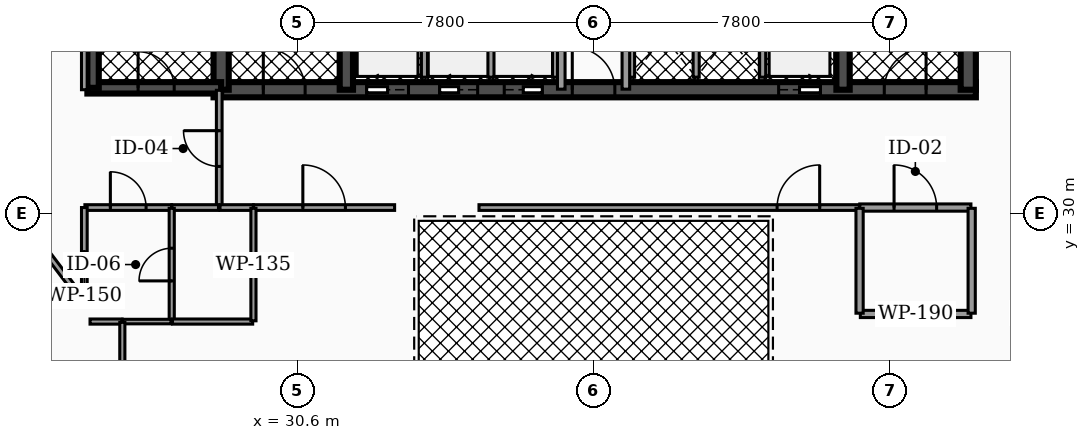
"""IFC4 building model, lengths in metres.
Left out: names, types, materials, properties, quantities, classifications, styles, units other than length and angle.
Written with IfcOpenShell. Run it as: python <this file> out.ifc"""

import sys

from ifc_helpers import new_model, si_unit, direction, frame, frame_2d, origin, place, context, subcontext, project, spatial, rectangle, extrude, element, fill, save


model = new_model("IFC4")
c1 = context("Model", 3, precision=1e-05, world=origin(), true_north=direction((0.0, 1.0)))
c2 = subcontext(c1, "Body", "Model", "MODEL_VIEW")
j1 = project(units=[si_unit("LENGTHUNIT", "METRE"), si_unit("PLANEANGLEUNIT", "RADIAN")], contexts=[c1])
p1 = place(None, origin())
s1 = spatial("IfcSite", under=j1, at=p1, CompositionType="ELEMENT")
p2 = place(p1, origin())
s2 = spatial("IfcBuilding", under=s1, at=p2, CompositionType="ELEMENT")
p3 = place(p2, frame((0.0, 0.0, 114.58)))
s3 = spatial("IfcBuildingStorey", under=s2, at=p3, CompositionType="ELEMENT", Elevation=114.58)
p4 = place(p3, frame((28.4, 33.25, 0.0), z_axis=(0.0, 0.0, 1.0), x_axis=(1.0, 0.0, 0.0)))
e1 = element("IfcWall", 1, at=p4, inside=s3, PredefinedType="SHEAR", context=c2, shape_type="SweptSolid", body=[
    extrude(rectangle(XDim=20.06, YDim=0.4, at=frame_2d((10.03, 0.0))), origin(), (0.0, 0.0, 1.0), 4.12),
])
p5 = place(p4, frame((4.03, 0.0, 0.0)))
e2 = element("IfcOpeningElement", 2, at=p5, cuts=e1, PredefinedType="OPENING", context=c2, shape_type="SweptSolid", body=[
    extrude(rectangle(XDim=1.1, YDim=2.15, at=frame_2d((0.55, 1.075))), frame((0.0, 0.21, 0.0), z_axis=(0.0, -1.0, 0.0), x_axis=(1.0, 0.0, 0.0)), (0.0, 0.0, 1.0), 0.42),
])
p6 = place(p4, frame((14.87, 0.0, 0.0)))
e3 = element("IfcOpeningElement", 3, at=p6, cuts=e1, PredefinedType="OPENING", context=c2, shape_type="SweptSolid", body=[
    extrude(rectangle(XDim=1.1, YDim=2.15, at=frame_2d((0.55, 1.075))), frame((0.0, 0.21, 0.0), z_axis=(0.0, -1.0, 0.0), x_axis=(1.0, 0.0, 0.0)), (0.0, 0.0, 1.0), 0.42),
])
p7 = place(p4, frame((5.95, 0.0, 0.0)))
e4 = element("IfcOpeningElement", 4, at=p7, cuts=e1, PredefinedType="OPENING", context=c2, shape_type="SweptSolid", body=[
    extrude(rectangle(XDim=1.0, YDim=2.1, at=frame_2d((0.5, 1.05))), frame((0.0, 0.21, 0.0), z_axis=(0.0, -1.0, 0.0), x_axis=(1.0, 0.0, 0.0)), (0.0, 0.0, 1.0), 0.42),
])
p8 = place(p4, frame((7.65, 0.0, 0.0)))
e5 = element("IfcOpeningElement", 5, at=p8, cuts=e1, PredefinedType="OPENING", context=c2, shape_type="SweptSolid", body=[
    extrude(rectangle(XDim=1.0, YDim=2.1, at=frame_2d((0.5, 1.05))), frame((0.0, 0.21, 0.0), z_axis=(0.0, -1.0, 0.0), x_axis=(1.0, 0.0, 0.0)), (0.0, 0.0, 1.0), 0.42),
])
p9 = place(p4, frame((1.31, 0.0, 0.0)))
e6 = element("IfcOpeningElement", 6, at=p9, cuts=e1, PredefinedType="OPENING", context=c2, shape_type="SweptSolid", body=[
    extrude(rectangle(XDim=1.1, YDim=2.2, at=frame_2d((0.55, 1.1))), frame((0.0, 0.21, 0.0), z_axis=(0.0, -1.0, 0.0), x_axis=(1.0, 0.0, 0.0)), (0.0, 0.0, 1.0), 0.42),
])
p10 = place(p4, frame((9.44, 0.0, 0.0)))
e7 = element("IfcOpeningElement", 7, at=p10, cuts=e1, PredefinedType="OPENING", context=c2, shape_type="SweptSolid", body=[
    extrude(rectangle(XDim=1.12, YDim=2.05, at=frame_2d((0.56, 1.025))), frame((0.0, 0.21, 0.0), z_axis=(0.0, -1.0, 0.0), x_axis=(1.0, 0.0, 0.0)), (0.0, 0.0, 1.0), 0.42),
])
p11 = place(p4, frame((17.65, 0.0, 0.0)))
e8 = element("IfcOpeningElement", 8, at=p11, cuts=e1, PredefinedType="OPENING", context=c2, shape_type="SweptSolid", body=[
    extrude(rectangle(XDim=1.1, YDim=2.2, at=frame_2d((0.55, 1.1))), frame((0.0, 0.21, 0.0), z_axis=(0.0, -1.0, 0.0), x_axis=(1.0, 0.0, 0.0)), (0.0, 0.0, 1.0), 0.42),
])
p12 = place(p3, frame((28.6, 33.25, 0.0), z_axis=(0.0, 0.0, 1.0), x_axis=(0.0, 1.0, 0.0)))
e9 = element("IfcWall", 9, at=p12, inside=s3, PredefinedType="SHEAR", context=c2, shape_type="SweptSolid", body=[
    extrude(rectangle(XDim=10.2, YDim=0.4, at=frame_2d((5.1, 0.0))), origin(), (0.0, 0.0, 1.0), 4.12),
])
for number, where, z_axis, x_axis in (
    (10, (31.895, 33.25, 0.0), (0.0, 0.0, 1.0), (0.0, 1.0, 0.0)),
    (11, (44.965, 33.25, 0.0), (0.0, 0.0, 1.0), (0.0, 1.0, 0.0)),
):
    element("IfcWall", number, at=place(p3, frame(where, z_axis=z_axis, x_axis=x_axis)), inside=s3, PredefinedType="SHEAR", context=c2, shape_type="SweptSolid", body=[
        extrude(rectangle(XDim=10.2, YDim=0.35, at=frame_2d((5.1, 0.0))), origin(), (0.0, 0.0, 1.0), 4.12),
    ])
p13 = place(p3, frame((48.26, 33.25, 0.0), z_axis=(0.0, 0.0, 1.0), x_axis=(0.0, 1.0, 0.0)))
e12 = element("IfcWall", 12, at=p13, inside=s3, PredefinedType="SHEAR", context=c2, shape_type="SweptSolid", body=[
    extrude(rectangle(XDim=10.2, YDim=0.4, at=frame_2d((5.1, 0.0))), origin(), (0.0, 0.0, 1.0), 4.12),
])
p14 = place(p3, frame((25.08, 33.3, 0.0), z_axis=(0.0, 0.0, 1.0), x_axis=(1.0, 0.0, 0.0)))
e13 = element("IfcWall", 13, at=p14, inside=s3, PredefinedType="SHEAR", context=c2, shape_type="SweptSolid", body=[
    extrude(rectangle(XDim=3.52, YDim=0.3, at=frame_2d((1.76, 0.0))), origin(), (0.0, 0.0, 1.0), 4.12),
])
p15 = place(p14, frame((1.335, 0.0, 0.0)))
e14 = element("IfcOpeningElement", 14, at=p15, cuts=e13, PredefinedType="OPENING", context=c2, shape_type="SweptSolid", body=[
    extrude(rectangle(XDim=0.95, YDim=2.2, at=frame_2d((0.475, 1.1))), frame((0.0, 0.16, 0.0), z_axis=(0.0, -1.0, 0.0), x_axis=(1.0, 0.0, 0.0)), (0.0, 0.0, 1.0), 0.32),
])
p16 = place(p3, frame((25.23, 33.3, 0.0), z_axis=(0.0, 0.0, 1.0), x_axis=(0.0, 1.0, 0.0)))
e15 = element("IfcWall", 15, at=p16, inside=s3, PredefinedType="SHEAR", context=c2, shape_type="SweptSolid", body=[
    extrude(rectangle(XDim=7.6, YDim=0.3, at=frame_2d((3.8, 0.0))), origin(), (0.0, 0.0, 1.0), 4.12),
])
for number, where, z_axis, x_axis in (
    (16, (33.95, 33.58, 0.0), (0.0, 0.0, 1.0), (0.0, 1.0, 0.0)),
    (17, (42.85, 33.58, 0.0), (0.0, 0.0, 1.0), (0.0, 1.0, 0.0)),
):
    element("IfcWall", number, at=place(p3, frame(where, z_axis=z_axis, x_axis=x_axis)), inside=s3, PredefinedType="SOLIDWALL", context=c2, shape_type="SweptSolid", body=[
        extrude(rectangle(XDim=2.45, YDim=0.16, at=frame_2d((1.225, 0.0))), origin(), (0.0, 0.0, 1.0), 3.092),
    ])
for number, where, z_axis, x_axis in (
    (18, (35.7, 33.58, 0.0), (0.0, 0.0, 1.0), (0.0, 1.0, 0.0)),
    (19, (37.4, 33.58, 0.0), (0.0, 0.0, 1.0), (0.0, 1.0, 0.0)),
    (20, (39.4, 33.58, 0.0), (0.0, 0.0, 1.0), (0.0, 1.0, 0.0)),
    (21, (41.1, 33.58, 0.0), (0.0, 0.0, 1.0), (0.0, 1.0, 0.0)),
):
    element("IfcWall", number, at=place(p3, frame(where, z_axis=z_axis, x_axis=x_axis)), inside=s3, PredefinedType="SOLIDWALL", context=c2, shape_type="SweptSolid", body=[
        extrude(rectangle(XDim=2.25, YDim=0.16, at=frame_2d((1.125, 0.0))), origin(), (0.0, 0.0, 1.0), 3.092),
    ])
p17 = place(p3, frame((37.55, 33.265, 0.0), z_axis=(0.0, 0.0, 1.0), x_axis=(0.0, 1.0, 0.0)))
e22 = element("IfcWall", 22, at=p17, inside=s3, PredefinedType="PARTITIONING", context=c2, shape_type="SweptSolid", body=[
    extrude(rectangle(XDim=4.595, YDim=0.2, at=frame_2d((2.298, 0.0))), origin(), (0.0, 0.0, 1.0), 3.077),
])
p18 = place(p17, frame((3.058, 0.0, 0.0)))
e23 = element("IfcOpeningElement", 23, at=p18, cuts=e22, PredefinedType="OPENING", context=c2, shape_type="SweptSolid", body=[
    extrude(rectangle(XDim=0.88, YDim=2.05, at=frame_2d((0.44, 1.025))), frame((0.0, 0.11, 0.0), z_axis=(0.0, -1.0, 0.0), x_axis=(1.0, 0.0, 0.0)), (0.0, 0.0, 1.0), 0.22),
])
p19 = place(p3, frame((39.25, 33.265, 0.0), z_axis=(0.0, 0.0, 1.0), x_axis=(0.0, 1.0, 0.0)))
e24 = element("IfcWall", 24, at=p19, inside=s3, PredefinedType="PARTITIONING", context=c2, shape_type="SweptSolid", body=[
    extrude(rectangle(XDim=4.595, YDim=0.2, at=frame_2d((2.298, 0.0))), origin(), (0.0, 0.0, 1.0), 3.077),
])
p20 = place(p19, frame((3.058, 0.0, 0.0)))
e25 = element("IfcOpeningElement", 25, at=p20, cuts=e24, PredefinedType="OPENING", context=c2, shape_type="SweptSolid", body=[
    extrude(rectangle(XDim=0.88, YDim=2.05, at=frame_2d((0.44, 1.025))), frame((0.0, 0.11, 0.0), z_axis=(0.0, -1.0, 0.0), x_axis=(1.0, 0.0, 0.0)), (0.0, 0.0, 1.0), 0.22),
])
p21 = place(p3, frame((45.405, 30.15, 0.0), z_axis=(0.0, 0.0, 1.0), x_axis=(1.0, 0.0, 0.0)))
e26 = element("IfcWall", 26, at=p21, inside=s3, PredefinedType="PARTITIONING", context=c2, shape_type="SweptSolid", body=[
    extrude(rectangle(XDim=2.925, YDim=0.19, at=frame_2d((1.462, 0.0))), origin(), (0.0, 0.0, 1.0), 3.077),
])
p22 = place(p21, frame((0.903, 0.0, 0.0)))
e27 = element("IfcOpeningElement", 27, at=p22, cuts=e26, PredefinedType="OPENING", context=c2, shape_type="SweptSolid", body=[
    extrude(rectangle(XDim=1.12, YDim=2.05, at=frame_2d((0.56, 1.025))), frame((0.0, 0.105, 0.0), z_axis=(0.0, -1.0, 0.0), x_axis=(1.0, 0.0, 0.0)), (0.0, 0.0, 1.0), 0.21),
])
p23 = place(p3, frame((28.55, 30.17, 0.0), z_axis=(0.0, 0.0, 1.0), x_axis=(0.0, 1.0, 0.0)))
e28 = element("IfcWall", 28, at=p23, inside=s3, PredefinedType="PARTITIONING", context=c2, shape_type="SweptSolid", body=[
    extrude(rectangle(XDim=3.065, YDim=0.15, at=frame_2d((1.533, 0.0))), origin(), (0.0, 0.0, 1.0), 3.077),
])
p24 = place(p23, frame((1.062, 0.0, 0.0)))
e29 = element("IfcOpeningElement", 29, at=p24, cuts=e28, PredefinedType="OPENING", context=c2, shape_type="SweptSolid", body=[
    extrude(rectangle(XDim=0.94, YDim=2.05, at=frame_2d((0.47, 1.025))), frame((0.0, 0.085, 0.0), z_axis=(0.0, -1.0, 0.0), x_axis=(1.0, 0.0, 0.0)), (0.0, 0.0, 1.0), 0.17),
])
p25 = place(p3, frame((28.57, 30.15, 0.0), z_axis=(0.0, 0.0, 1.0), x_axis=(1.0, 0.0, 0.0)))
e30 = element("IfcWall", 30, at=p25, inside=s3, PredefinedType="PARTITIONING", context=c2, shape_type="SweptSolid", body=[
    extrude(rectangle(XDim=0.875, YDim=0.15, at=frame_2d((0.438, 0.0))), origin(), (0.0, 0.0, 1.0), 3.077),
])
p26 = place(p3, frame((29.455, 30.15, 0.0), z_axis=(0.0, 0.0, 1.0), x_axis=(1.0, 0.0, 0.0)))
e31 = element("IfcWall", 31, at=p26, inside=s3, PredefinedType="PARTITIONING", context=c2, shape_type="SweptSolid", body=[
    extrude(rectangle(XDim=3.71, YDim=0.15, at=frame_2d((1.855, 0.0))), origin(), (0.0, 0.0, 1.0), 3.077),
])
p27 = place(p26, frame((1.295, 0.0, 0.0)))
e32 = element("IfcOpeningElement", 32, at=p27, cuts=e31, PredefinedType="OPENING", context=c2, shape_type="SweptSolid", body=[
    extrude(rectangle(XDim=1.12, YDim=2.05, at=frame_2d((0.56, 1.025))), frame((0.0, 0.085, 0.0), z_axis=(0.0, -1.0, 0.0), x_axis=(1.0, 0.0, 0.0)), (0.0, 0.0, 1.0), 0.17),
])
p28 = place(p3, frame((35.385, 30.15, 0.0), z_axis=(0.0, 0.0, 1.0), x_axis=(1.0, 0.0, 0.0)))
e33 = element("IfcWall", 33, at=p28, inside=s3, PredefinedType="PARTITIONING", context=c2, shape_type="SweptSolid", body=[
    extrude(rectangle(XDim=10.01, YDim=0.15, at=frame_2d((5.005, 0.0))), origin(), (0.0, 0.0, 1.0), 3.077),
])
p29 = place(p28, frame((7.845, 0.0, 0.0)))
e34 = element("IfcOpeningElement", 34, at=p29, cuts=e33, PredefinedType="OPENING", context=c2, shape_type="SweptSolid", body=[
    extrude(rectangle(XDim=1.12, YDim=2.05, at=frame_2d((0.56, 1.025))), frame((0.0, 0.085, 0.0), z_axis=(0.0, -1.0, 0.0), x_axis=(1.0, 0.0, 0.0)), (0.0, 0.0, 1.0), 0.17),
])
p30 = place(p3, frame((45.42, 27.35, 0.0), z_axis=(0.0, 0.0, 1.0), x_axis=(1.0, 0.0, 0.0)))
e35 = element("IfcWall", 35, at=p30, inside=s3, PredefinedType="PARTITIONING", context=c2, shape_type="SweptSolid", body=[
    extrude(rectangle(XDim=2.91, YDim=0.19, at=frame_2d((1.455, 0.0))), origin(), (0.0, 0.0, 1.0), 3.077),
])
for number, where, z_axis, x_axis in (
    (36, (45.4, 27.37, 0.0), (0.0, 0.0, 1.0), (0.0, 1.0, 0.0)),
    (37, (48.35, 27.37, 0.0), (0.0, 0.0, 1.0), (0.0, 1.0, 0.0)),
):
    element("IfcWall", number, at=place(p3, frame(where, z_axis=z_axis, x_axis=x_axis)), inside=s3, PredefinedType="PARTITIONING", context=c2, shape_type="SweptSolid", body=[
        extrude(rectangle(XDim=2.76, YDim=0.19, at=frame_2d((1.38, 0.0))), origin(), (0.0, 0.0, 1.0), 3.077),
    ])
p31 = place(p3, frame((25.015, 30.15, 0.0), z_axis=(0.0, 0.0, 1.0), x_axis=(1.0, 0.0, 0.0)))
e38 = element("IfcWall", 38, at=p31, inside=s3, PredefinedType="PARTITIONING", context=c2, shape_type="SweptSolid", body=[
    extrude(rectangle(XDim=2.28, YDim=0.15, at=frame_2d((1.14, 0.0))), origin(), (0.0, 0.0, 1.0), 3.077),
])
p32 = place(p31, frame((0.67, 0.0, 0.0)))
e39 = element("IfcOpeningElement", 39, at=p32, cuts=e38, PredefinedType="OPENING", context=c2, shape_type="SweptSolid", body=[
    extrude(rectangle(XDim=0.94, YDim=2.05, at=frame_2d((0.47, 1.025))), frame((0.0, 0.085, 0.0), z_axis=(0.0, -1.0, 0.0), x_axis=(1.0, 0.0, 0.0)), (0.0, 0.0, 1.0), 0.17),
])
p33 = place(p3, frame((27.305, 30.15, 0.0), z_axis=(0.0, 0.0, 1.0), x_axis=(1.0, 0.0, 0.0)))
e40 = element("IfcWall", 40, at=p33, inside=s3, PredefinedType="PARTITIONING", context=c2, shape_type="SweptSolid", body=[
    extrude(rectangle(XDim=1.225, YDim=0.15, at=frame_2d((0.613, 0.0))), origin(), (0.0, 0.0, 1.0), 3.077),
])
p34 = place(p3, frame((25.0, 27.675, 0.0), z_axis=(0.0, 0.0, 1.0), x_axis=(0.0, 1.0, 0.0)))
e41 = element("IfcWall", 41, at=p34, inside=s3, PredefinedType="PARTITIONING", context=c2, shape_type="SweptSolid", body=[
    extrude(rectangle(XDim=2.475, YDim=0.15, at=frame_2d((1.237, 0.0))), origin(), (0.0, 0.0, 1.0), 3.077),
])
p35 = place(p3, frame((22.662, 30.741, 0.0), z_axis=(0.0, 0.0, 1.0), x_axis=(0.603806431354, -0.797130976349, 0.0)))
e42 = element("IfcWall", 42, at=p35, inside=s3, PredefinedType="PARTITIONING", context=c2, shape_type="SweptSolid", body=[
    extrude(rectangle(XDim=3.852, YDim=0.15, at=frame_2d((1.926, 0.0))), origin(), (0.0, 0.0, 1.0), 3.077),
])
p36 = place(p3, frame((25.0, 33.25, 0.0), z_axis=(0.0, 0.0, 1.0), x_axis=(0.0, 1.0, 0.0)))
e43 = element("IfcWall", 43, at=p36, inside=s3, PredefinedType="PARTITIONING", context=c2, shape_type="SweptSolid", body=[
    extrude(rectangle(XDim=9.23, YDim=0.15, at=frame_2d((4.615, 0.0))), origin(), (0.0, 0.0, 1.0), 3.077),
])
p37 = place(p3, frame((27.3, 27.17, 0.0), z_axis=(0.0, 0.0, 1.0), x_axis=(0.0, 1.0, 0.0)))
e44 = element("IfcWall", 44, at=p37, inside=s3, PredefinedType="PARTITIONING", context=c2, shape_type="SweptSolid", body=[
    extrude(rectangle(XDim=2.96, YDim=0.135, at=frame_2d((1.48, 0.0))), origin(), (0.0, 0.0, 1.0), 3.077),
])
p38 = place(p37, frame((1.05, 0.0, 0.0)))
e45 = element("IfcOpeningElement", 45, at=p38, cuts=e44, PredefinedType="OPENING", context=c2, shape_type="SweptSolid", body=[
    extrude(rectangle(XDim=0.86, YDim=2.05, at=frame_2d((0.43, 1.025))), frame((0.0, 0.077, 0.0), z_axis=(0.0, -1.0, 0.0), x_axis=(1.0, 0.0, 0.0)), (0.0, 0.0, 1.0), 0.155),
])
p39 = place(p3, frame((26.005, 27.15, 0.0), z_axis=(0.0, 0.0, 1.0), x_axis=(1.0, 0.0, 0.0)))
e46 = element("IfcWall", 46, at=p39, inside=s3, PredefinedType="PARTITIONING", context=c2, shape_type="SweptSolid", body=[
    extrude(rectangle(XDim=1.275, YDim=0.12, at=frame_2d((0.638, 0.0))), origin(), (0.0, 0.0, 1.0), 3.077),
])
p40 = place(p3, frame((25.15, 27.15, 0.0), z_axis=(0.0, 0.0, 1.0), x_axis=(1.0, 0.0, 0.0)))
e47 = element("IfcWall", 47, at=p40, inside=s3, PredefinedType="PARTITIONING", context=c2, shape_type="SweptSolid", body=[
    extrude(rectangle(XDim=0.845, YDim=0.135, at=frame_2d((0.423, 0.0))), origin(), (0.0, 0.0, 1.0), 3.077),
])
p41 = place(p3, frame((27.32, 27.15, 0.0), z_axis=(0.0, 0.0, 1.0), x_axis=(1.0, 0.0, 0.0)))
e48 = element("IfcWall", 48, at=p41, inside=s3, PredefinedType="PARTITIONING", context=c2, shape_type="SweptSolid", body=[
    extrude(rectangle(XDim=2.11, YDim=0.135, at=frame_2d((1.055, 0.0))), origin(), (0.0, 0.0, 1.0), 3.077),
])
p42 = place(p3, frame((29.45, 27.17, 0.0), z_axis=(0.0, 0.0, 1.0), x_axis=(0.0, 1.0, 0.0)))
e49 = element("IfcWall", 49, at=p42, inside=s3, PredefinedType="PARTITIONING", context=c2, shape_type="SweptSolid", body=[
    extrude(rectangle(XDim=2.96, YDim=0.135, at=frame_2d((1.48, 0.0))), origin(), (0.0, 0.0, 1.0), 3.077),
])
p43 = place(p3, frame((26.0, 22.607, 0.0), z_axis=(0.0, 0.0, 1.0), x_axis=(0.0, 1.0, 0.0)))
e50 = element("IfcWall", 50, at=p43, inside=s3, PredefinedType="PARTITIONING", context=c2, shape_type="SweptSolid", body=[
    extrude(rectangle(XDim=4.522, YDim=0.135, at=frame_2d((2.261, 0.0))), origin(), (0.0, 0.0, 1.0), 3.077),
])
p44 = place(p5, origin())
e51 = element("IfcDoor", 51, at=p44, inside=s3, OperationType="SLIDING_TO_LEFT", PredefinedType="DOOR", context=c2, shape_type="SweptSolid", body=[
    extrude(rectangle(XDim=1.1, YDim=2.15, at=frame_2d((0.55, 1.075))), frame((0.0, 0.025, 0.0), z_axis=(0.0, -1.0, 0.0), x_axis=(1.0, 0.0, 0.0)), (0.0, 0.0, 1.0), 0.05),
])
fill(e2, e51)
p45 = place(p6, origin())
e52 = element("IfcDoor", 52, at=p45, inside=s3, OperationType="SLIDING_TO_RIGHT", PredefinedType="DOOR", context=c2, shape_type="SweptSolid", body=[
    extrude(rectangle(XDim=1.1, YDim=2.15, at=frame_2d((0.55, 1.075))), frame((0.0, 0.025, 0.0), z_axis=(0.0, -1.0, 0.0), x_axis=(1.0, 0.0, 0.0)), (0.0, 0.0, 1.0), 0.05),
])
fill(e3, e52)
p46 = place(p7, origin())
e53 = element("IfcDoor", 53, at=p46, inside=s3, OperationType="SLIDING_TO_LEFT", PredefinedType="DOOR", context=c2, shape_type="SweptSolid", body=[
    extrude(rectangle(XDim=1.0, YDim=2.1, at=frame_2d((0.5, 1.05))), frame((0.0, 0.025, 0.0), z_axis=(0.0, -1.0, 0.0), x_axis=(1.0, 0.0, 0.0)), (0.0, 0.0, 1.0), 0.05),
])
fill(e4, e53)
p47 = place(p8, origin())
e54 = element("IfcDoor", 54, at=p47, inside=s3, OperationType="SLIDING_TO_RIGHT", PredefinedType="DOOR", context=c2, shape_type="SweptSolid", body=[
    extrude(rectangle(XDim=1.0, YDim=2.1, at=frame_2d((0.5, 1.05))), frame((0.0, 0.025, 0.0), z_axis=(0.0, -1.0, 0.0), x_axis=(1.0, 0.0, 0.0)), (0.0, 0.0, 1.0), 0.05),
])
fill(e5, e54)
p48 = place(p9, origin())
e55 = element("IfcDoor", 55, at=p48, inside=s3, OperationType="SINGLE_SWING_LEFT", PredefinedType="DOOR", context=c2, shape_type="SweptSolid", body=[
    extrude(rectangle(XDim=1.1, YDim=2.2, at=frame_2d((0.55, 1.1))), frame((0.0, 0.025, 0.0), z_axis=(0.0, -1.0, 0.0), x_axis=(1.0, 0.0, 0.0)), (0.0, 0.0, 1.0), 0.05),
])
fill(e6, e55)
p49 = place(p10, origin())
e56 = element("IfcDoor", 56, at=p49, inside=s3, OperationType="SINGLE_SWING_LEFT", PredefinedType="DOOR", context=c2, shape_type="SweptSolid", body=[
    extrude(rectangle(XDim=1.12, YDim=2.05, at=frame_2d((0.56, 1.025))), frame((0.0, 0.025, 0.0), z_axis=(0.0, -1.0, 0.0), x_axis=(1.0, 0.0, 0.0)), (0.0, 0.0, 1.0), 0.05),
])
fill(e7, e56)
p50 = place(p11, origin())
e57 = element("IfcDoor", 57, at=p50, inside=s3, OperationType="SINGLE_SWING_RIGHT", PredefinedType="DOOR", context=c2, shape_type="SweptSolid", body=[
    extrude(rectangle(XDim=1.1, YDim=2.2, at=frame_2d((0.55, 1.1))), frame((0.0, 0.025, 0.0), z_axis=(0.0, -1.0, 0.0), x_axis=(1.0, 0.0, 0.0)), (0.0, 0.0, 1.0), 0.05),
])
fill(e8, e57)
p51 = place(p15, origin())
e58 = element("IfcDoor", 58, at=p51, inside=s3, OperationType="SINGLE_SWING_LEFT", PredefinedType="DOOR", context=c2, shape_type="SweptSolid", body=[
    extrude(rectangle(XDim=0.95, YDim=2.2, at=frame_2d((0.475, 1.1))), frame((0.0, 0.025, 0.0), z_axis=(0.0, -1.0, 0.0), x_axis=(1.0, 0.0, 0.0)), (0.0, 0.0, 1.0), 0.05),
])
fill(e14, e58)
p52 = place(p22, origin())
e59 = element("IfcDoor", 59, at=p52, inside=s3, OperationType="SINGLE_SWING_LEFT", PredefinedType="DOOR", context=c2, shape_type="SweptSolid", body=[
    extrude(rectangle(XDim=1.12, YDim=2.05, at=frame_2d((0.56, 1.025))), frame((0.0, 0.025, 0.0), z_axis=(0.0, -1.0, 0.0), x_axis=(1.0, 0.0, 0.0)), (0.0, 0.0, 1.0), 0.05),
])
fill(e27, e59)
p53 = place(p24, origin())
e60 = element("IfcDoor", 60, at=p53, inside=s3, OperationType="SINGLE_SWING_RIGHT", PredefinedType="DOOR", context=c2, shape_type="SweptSolid", body=[
    extrude(rectangle(XDim=0.94, YDim=2.05, at=frame_2d((0.47, 1.025))), frame((0.0, 0.025, 0.0), z_axis=(0.0, -1.0, 0.0), x_axis=(1.0, 0.0, 0.0)), (0.0, 0.0, 1.0), 0.05),
])
fill(e29, e60)
p54 = place(p27, origin())
e61 = element("IfcDoor", 61, at=p54, inside=s3, OperationType="SINGLE_SWING_LEFT", PredefinedType="DOOR", context=c2, shape_type="SweptSolid", body=[
    extrude(rectangle(XDim=1.12, YDim=2.05, at=frame_2d((0.56, 1.025))), frame((0.0, 0.025, 0.0), z_axis=(0.0, -1.0, 0.0), x_axis=(1.0, 0.0, 0.0)), (0.0, 0.0, 1.0), 0.05),
])
fill(e32, e61)
p55 = place(p29, origin())
e62 = element("IfcDoor", 62, at=p55, inside=s3, OperationType="SINGLE_SWING_RIGHT", PredefinedType="DOOR", context=c2, shape_type="SweptSolid", body=[
    extrude(rectangle(XDim=1.12, YDim=2.05, at=frame_2d((0.56, 1.025))), frame((0.0, 0.025, 0.0), z_axis=(0.0, -1.0, 0.0), x_axis=(1.0, 0.0, 0.0)), (0.0, 0.0, 1.0), 0.05),
])
fill(e34, e62)
p56 = place(p32, origin())
e63 = element("IfcDoor", 63, at=p56, inside=s3, OperationType="SINGLE_SWING_LEFT", PredefinedType="DOOR", context=c2, shape_type="SweptSolid", body=[
    extrude(rectangle(XDim=0.94, YDim=2.05, at=frame_2d((0.47, 1.025))), frame((0.0, 0.025, 0.0), z_axis=(0.0, -1.0, 0.0), x_axis=(1.0, 0.0, 0.0)), (0.0, 0.0, 1.0), 0.05),
])
fill(e39, e63)
p57 = place(p38, origin())
e64 = element("IfcDoor", 64, at=p57, inside=s3, OperationType="SINGLE_SWING_LEFT", PredefinedType="DOOR", context=c2, shape_type="SweptSolid", body=[
    extrude(rectangle(XDim=0.86, YDim=2.05, at=frame_2d((0.43, 1.025))), frame((0.0, 0.025, 0.0), z_axis=(0.0, -1.0, 0.0), x_axis=(1.0, 0.0, 0.0)), (0.0, 0.0, 1.0), 0.05),
])
fill(e45, e64)
save(model, sys.argv[1])
